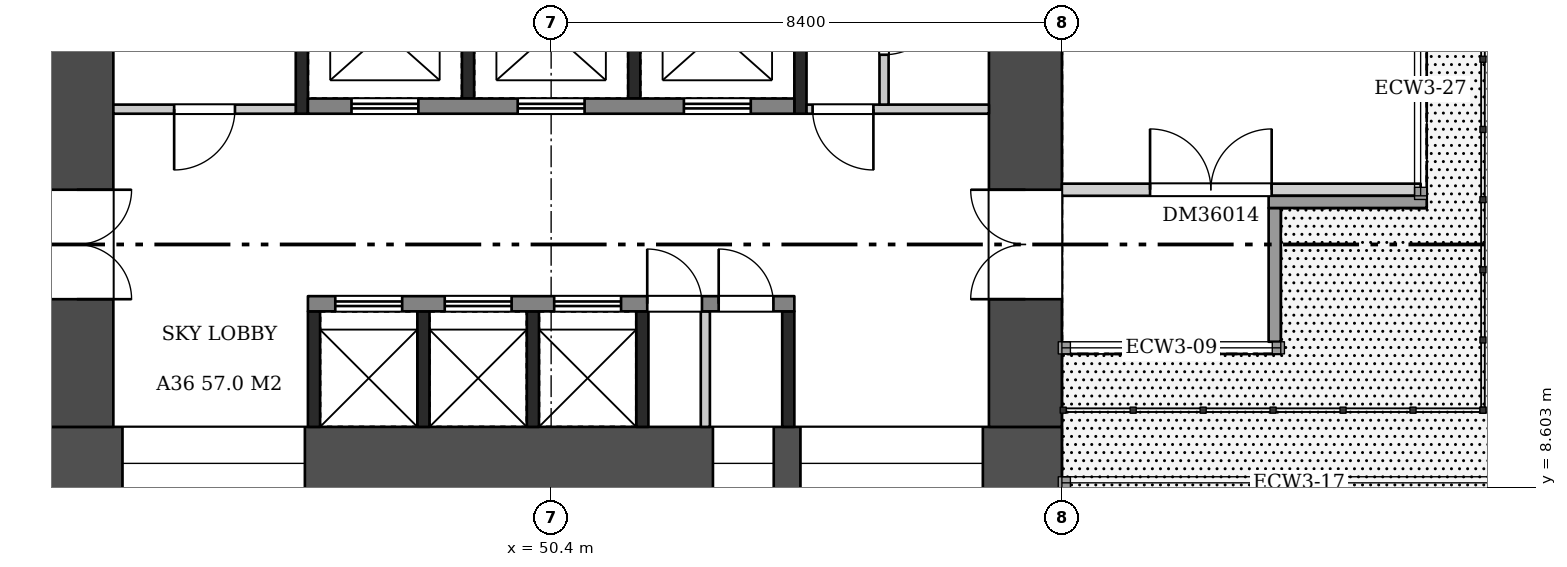
"""IFC4 building model, lengths in metres.
Left out: names, types, materials, properties, quantities, classifications, styles, units other than length and angle.
Written with IfcOpenShell. Run it as: python <this file> out.ifc"""

import sys

from ifc_helpers import new_model, si_unit, direction, frame, frame_2d, origin, place, context, subcontext, project, spatial, rectangle, extrude, element, fill, save


model = new_model("IFC4")
c1 = context("Model", 3, precision=1e-05, world=origin(), true_north=direction((0.0, 1.0)))
c2 = subcontext(c1, "Body", "Model", "MODEL_VIEW")
j1 = project(units=[si_unit("LENGTHUNIT", "METRE"), si_unit("PLANEANGLEUNIT", "RADIAN")], contexts=[c1])
p1 = place(None, origin())
s1 = spatial("IfcSite", under=j1, at=p1, CompositionType="ELEMENT")
p2 = place(p1, origin())
s2 = spatial("IfcBuilding", under=s1, at=p2, CompositionType="ELEMENT")
p3 = place(p2, frame((0.0, 0.0, 140.7)))
s3 = spatial("IfcBuildingStorey", under=s2, at=p3, CompositionType="ELEMENT", Elevation=140.7)
p4 = place(p3, frame((42.0, 9.0, 0.0), z_axis=(0.0, 0.0, 1.0), x_axis=(1.0, 0.0, 0.0)))
e1 = element("IfcWall", 1, at=p4, inside=s3, PredefinedType="SHEAR", context=c2, shape_type="SweptSolid", body=[
    extrude(rectangle(XDim=16.8, YDim=1.2, at=frame_2d((8.4, 0.0))), origin(), (0.0, 0.0, 1.0), 6.72),
])
p5 = place(p4, frame((1.35, 0.0, 0.6)))
e2 = element("IfcOpeningElement", 2, at=p5, cuts=e1, PredefinedType="OPENING", context=c2, shape_type="SweptSolid", body=[
    extrude(rectangle(XDim=3.0, YDim=2.1, at=frame_2d((1.5, 1.05))), frame((0.0, 0.61, 0.0), z_axis=(0.0, -1.0, 0.0), x_axis=(1.0, 0.0, 0.0)), (0.0, 0.0, 1.0), 1.22),
])
p6 = place(p4, frame((11.061, 0.0, 1.6)))
e3 = element("IfcOpeningElement", 3, at=p6, cuts=e1, PredefinedType="OPENING", context=c2, shape_type="SweptSolid", body=[
    extrude(rectangle(XDim=1.0, YDim=1.2, at=frame_2d((0.5, 0.6))), frame((0.0, 0.61, 0.0), z_axis=(0.0, -1.0, 0.0), x_axis=(1.0, 0.0, 0.0)), (0.0, 0.0, 1.0), 1.22),
])
p7 = place(p4, frame((12.5, 0.0, 0.6)))
e4 = element("IfcOpeningElement", 4, at=p7, cuts=e1, PredefinedType="OPENING", context=c2, shape_type="SweptSolid", body=[
    extrude(rectangle(XDim=3.0, YDim=2.1, at=frame_2d((1.5, 1.05))), frame((0.0, 0.61, 0.0), z_axis=(0.0, -1.0, 0.0), x_axis=(1.0, 0.0, 0.0)), (0.0, 0.0, 1.0), 1.22),
])
p8 = place(p3, frame((42.6, 9.6, 0.0), z_axis=(0.0, 0.0, 1.0), x_axis=(0.0, 1.0, 0.0)))
e5 = element("IfcWall", 5, at=p8, inside=s3, PredefinedType="SHEAR", context=c2, shape_type="SweptSolid", body=[
    extrude(rectangle(XDim=14.4, YDim=1.2, at=frame_2d((7.2, 0.0))), origin(), (0.0, 0.0, 1.0), 6.72),
])
p9 = place(p8, frame((2.1, 0.0, 0.0)))
e6 = element("IfcOpeningElement", 6, at=p9, cuts=e5, PredefinedType="OPENING", context=c2, shape_type="SweptSolid", body=[
    extrude(rectangle(XDim=1.8, YDim=2.1, at=frame_2d((0.9, 1.05))), frame((0.0, 0.61, 0.0), z_axis=(0.0, -1.0, 0.0), x_axis=(1.0, 0.0, 0.0)), (0.0, 0.0, 1.0), 1.22),
])
p10 = place(p3, frame((58.2, 9.6, 0.0), z_axis=(0.0, 0.0, 1.0), x_axis=(0.0, 1.0, 0.0)))
e7 = element("IfcWall", 7, at=p10, inside=s3, PredefinedType="SHEAR", context=c2, shape_type="SweptSolid", body=[
    extrude(rectangle(XDim=14.4, YDim=1.2, at=frame_2d((7.2, 0.0))), origin(), (0.0, 0.0, 1.0), 6.72),
])
p11 = place(p10, frame((2.1, 0.0, 0.0)))
e8 = element("IfcOpeningElement", 8, at=p11, cuts=e7, PredefinedType="OPENING", context=c2, shape_type="SweptSolid", body=[
    extrude(rectangle(XDim=1.8, YDim=2.1, at=frame_2d((0.9, 1.05))), frame((0.0, 0.61, 0.0), z_axis=(0.0, -1.0, 0.0), x_axis=(1.0, 0.0, 0.0)), (0.0, 0.0, 1.0), 1.22),
])
for number, where, z_axis, x_axis in (
    (9, (46.5, 9.6, 0.0), (0.0, 0.0, 1.0), (0.0, 1.0, 0.0)),
    (10, (48.3, 9.6, 0.0), (0.0, 0.0, 1.0), (0.0, 1.0, 0.0)),
    (11, (50.1, 9.6, 0.0), (0.0, 0.0, 1.0), (0.0, 1.0, 0.0)),
    (12, (51.9, 9.6, 0.0), (0.0, 0.0, 1.0), (0.0, 1.0, 0.0)),
    (13, (54.3, 9.6, 0.0), (0.0, 0.0, 1.0), (0.0, 1.0, 0.0)),
):
    element("IfcWall", number, at=place(p3, frame(where, z_axis=z_axis, x_axis=x_axis)), inside=s3, PredefinedType="SHEAR", context=c2, shape_type="SweptSolid", body=[
        extrude(rectangle(XDim=1.9, YDim=0.2, at=frame_2d((0.95, 0.0))), origin(), (0.0, 0.0, 1.0), 6.72),
    ])
p12 = place(p3, frame((52.936, 9.6, 0.0), z_axis=(0.0, 0.0, 1.0), x_axis=(0.0, 1.0, 0.0)))
e14 = element("IfcWall", 14, at=p12, inside=s3, PredefinedType="PARTITIONING", context=c2, shape_type="SweptSolid", body=[
    extrude(rectangle(XDim=1.9, YDim=0.15, at=frame_2d((0.95, 0.0))), origin(), (0.0, 0.0, 1.0), 6.72),
])
p13 = place(p3, frame((46.4, 11.625, 0.0), z_axis=(0.0, 0.0, 1.0), x_axis=(1.0, 0.0, 0.0)))
e15 = element("IfcWall", 15, at=p13, inside=s3, PredefinedType="SHEAR", context=c2, shape_type="SweptSolid", body=[
    extrude(rectangle(XDim=8.0, YDim=0.25, at=frame_2d((4.0, 0.0))), origin(), (0.0, 0.0, 1.0), 6.72),
])
p14 = place(p13, frame((0.45, 0.0, 0.0)))
e16 = element("IfcOpeningElement", 16, at=p14, cuts=e15, PredefinedType="OPENING", context=c2, shape_type="SweptSolid", body=[
    extrude(rectangle(XDim=1.1, YDim=2.1, at=frame_2d((0.55, 1.05))), frame((0.0, 0.135, 0.0), z_axis=(0.0, -1.0, 0.0), x_axis=(1.0, 0.0, 0.0)), (0.0, 0.0, 1.0), 0.27),
])
p15 = place(p13, frame((2.25, 0.0, 0.0)))
e17 = element("IfcOpeningElement", 17, at=p15, cuts=e15, PredefinedType="OPENING", context=c2, shape_type="SweptSolid", body=[
    extrude(rectangle(XDim=1.1, YDim=2.1, at=frame_2d((0.55, 1.05))), frame((0.0, 0.135, 0.0), z_axis=(0.0, -1.0, 0.0), x_axis=(1.0, 0.0, 0.0)), (0.0, 0.0, 1.0), 0.27),
])
p16 = place(p13, frame((4.05, 0.0, 0.0)))
e18 = element("IfcOpeningElement", 18, at=p16, cuts=e15, PredefinedType="OPENING", context=c2, shape_type="SweptSolid", body=[
    extrude(rectangle(XDim=1.1, YDim=2.1, at=frame_2d((0.55, 1.05))), frame((0.0, 0.135, 0.0), z_axis=(0.0, -1.0, 0.0), x_axis=(1.0, 0.0, 0.0)), (0.0, 0.0, 1.0), 0.27),
])
p17 = place(p13, frame((5.581, 0.0, 0.0)))
e19 = element("IfcOpeningElement", 19, at=p17, cuts=e15, PredefinedType="OPENING", context=c2, shape_type="SweptSolid", body=[
    extrude(rectangle(XDim=0.9, YDim=2.1, at=frame_2d((0.45, 1.05))), frame((0.0, 0.135, 0.0), z_axis=(0.0, -1.0, 0.0), x_axis=(1.0, 0.0, 0.0)), (0.0, 0.0, 1.0), 0.27),
])
p18 = place(p13, frame((6.756, 0.0, 0.0)))
e20 = element("IfcOpeningElement", 20, at=p18, cuts=e15, PredefinedType="OPENING", context=c2, shape_type="SweptSolid", body=[
    extrude(rectangle(XDim=0.9, YDim=2.1, at=frame_2d((0.45, 1.05))), frame((0.0, 0.135, 0.0), z_axis=(0.0, -1.0, 0.0), x_axis=(1.0, 0.0, 0.0)), (0.0, 0.0, 1.0), 0.27),
])
for number, where, z_axis, x_axis in (
    (21, (49.033, 15.0, 0.0), (0.0, 0.0, 1.0), (0.0, 1.0, 0.0)),
    (22, (51.767, 15.0, 0.0), (0.0, 0.0, 1.0), (0.0, 1.0, 0.0)),
):
    element("IfcWall", number, at=place(p3, frame(where, z_axis=z_axis, x_axis=x_axis)), inside=s3, PredefinedType="SHEAR", context=c2, shape_type="SweptSolid", body=[
        extrude(rectangle(XDim=1.9, YDim=0.2, at=frame_2d((0.95, 0.0))), origin(), (0.0, 0.0, 1.0), 6.72),
    ])
p19 = place(p3, frame((46.4, 14.875, 0.0), z_axis=(0.0, 0.0, 1.0), x_axis=(1.0, 0.0, 0.0)))
e23 = element("IfcWall", 23, at=p19, inside=s3, PredefinedType="SHEAR", context=c2, shape_type="SweptSolid", body=[
    extrude(rectangle(XDim=8.0, YDim=0.25, at=frame_2d((4.0, 0.0))), origin(), (0.0, 0.0, 1.0), 6.72),
])
p20 = place(p19, frame((0.717, 0.0, 0.0)))
e24 = element("IfcOpeningElement", 24, at=p20, cuts=e23, PredefinedType="OPENING", context=c2, shape_type="SweptSolid", body=[
    extrude(rectangle(XDim=1.1, YDim=2.1, at=frame_2d((0.55, 1.05))), frame((0.0, 0.135, 0.0), z_axis=(0.0, -1.0, 0.0), x_axis=(1.0, 0.0, 0.0)), (0.0, 0.0, 1.0), 0.27),
])
p21 = place(p19, frame((3.45, 0.0, 0.0)))
e25 = element("IfcOpeningElement", 25, at=p21, cuts=e23, PredefinedType="OPENING", context=c2, shape_type="SweptSolid", body=[
    extrude(rectangle(XDim=1.1, YDim=2.1, at=frame_2d((0.55, 1.05))), frame((0.0, 0.135, 0.0), z_axis=(0.0, -1.0, 0.0), x_axis=(1.0, 0.0, 0.0)), (0.0, 0.0, 1.0), 0.27),
])
p22 = place(p19, frame((6.183, 0.0, 0.0)))
e26 = element("IfcOpeningElement", 26, at=p22, cuts=e23, PredefinedType="OPENING", context=c2, shape_type="SweptSolid", body=[
    extrude(rectangle(XDim=1.1, YDim=2.1, at=frame_2d((0.55, 1.05))), frame((0.0, 0.135, 0.0), z_axis=(0.0, -1.0, 0.0), x_axis=(1.0, 0.0, 0.0)), (0.0, 0.0, 1.0), 0.27),
])
p23 = place(p3, frame((46.3, 14.75, 0.0), z_axis=(0.0, 0.0, 1.0), x_axis=(0.0, 1.0, 0.0)))
e27 = element("IfcWall", 27, at=p23, inside=s3, PredefinedType="SHEAR", context=c2, shape_type="SweptSolid", body=[
    extrude(rectangle(XDim=2.4, YDim=0.2, at=frame_2d((1.2, 0.0))), origin(), (0.0, 0.0, 1.0), 6.72),
])
p24 = place(p3, frame((43.2, 14.825, 0.0), z_axis=(0.0, 0.0, 1.0), x_axis=(1.0, 0.0, 0.0)))
e28 = element("IfcWall", 28, at=p24, inside=s3, PredefinedType="PARTITIONING", context=c2, shape_type="SweptSolid", body=[
    extrude(rectangle(XDim=3.0, YDim=0.15, at=frame_2d((1.5, 0.0))), origin(), (0.0, 0.0, 1.0), 6.72),
])
p25 = place(p24, frame((1.0, 0.0, 0.0)))
e29 = element("IfcOpeningElement", 29, at=p25, cuts=e28, PredefinedType="OPENING", context=c2, shape_type="SweptSolid", body=[
    extrude(rectangle(XDim=1.0, YDim=2.1, at=frame_2d((0.5, 1.05))), frame((0.0, 0.085, 0.0), z_axis=(0.0, -1.0, 0.0), x_axis=(1.0, 0.0, 0.0)), (0.0, 0.0, 1.0), 0.17),
])
p26 = place(p3, frame((54.5, 14.75, 0.0), z_axis=(0.0, 0.0, 1.0), x_axis=(0.0, 1.0, 0.0)))
e30 = element("IfcWall", 30, at=p26, inside=s3, PredefinedType="SHEAR", context=c2, shape_type="SweptSolid", body=[
    extrude(rectangle(XDim=9.25, YDim=0.2, at=frame_2d((4.625, 0.0))), origin(), (0.0, 0.0, 1.0), 6.72),
])
p27 = place(p3, frame((54.6, 14.825, 0.0), z_axis=(0.0, 0.0, 1.0), x_axis=(1.0, 0.0, 0.0)))
e31 = element("IfcWall", 31, at=p27, inside=s3, PredefinedType="PARTITIONING", context=c2, shape_type="SweptSolid", body=[
    extrude(rectangle(XDim=3.0, YDim=0.15, at=frame_2d((1.5, 0.0))), origin(), (0.0, 0.0, 1.0), 6.72),
])
p28 = place(p27, frame((0.1, 0.0, 0.0)))
e32 = element("IfcOpeningElement", 32, at=p28, cuts=e31, PredefinedType="OPENING", context=c2, shape_type="SweptSolid", body=[
    extrude(rectangle(XDim=1.0, YDim=2.1, at=frame_2d((0.5, 1.05))), frame((0.0, 0.085, 0.0), z_axis=(0.0, -1.0, 0.0), x_axis=(1.0, 0.0, 0.0)), (0.0, 0.0, 1.0), 0.17),
])
p29 = place(p3, frame((55.875, 14.9, 0.0), z_axis=(0.0, 0.0, 1.0), x_axis=(0.0, 1.0, 0.0)))
e33 = element("IfcWall", 33, at=p29, inside=s3, PredefinedType="PARTITIONING", context=c2, shape_type="SweptSolid", body=[
    extrude(rectangle(XDim=9.1, YDim=0.15, at=frame_2d((4.55, 0.0))), origin(), (0.0, 0.0, 1.0), 6.72),
])
p30 = place(p29, frame((0.82, 0.0, 0.0)))
e34 = element("IfcOpeningElement", 34, at=p30, cuts=e33, PredefinedType="OPENING", context=c2, shape_type="SweptSolid", body=[
    extrude(rectangle(XDim=1.0, YDim=2.1, at=frame_2d((0.5, 1.05))), frame((0.0, 0.085, 0.0), z_axis=(0.0, -1.0, 0.0), x_axis=(1.0, 0.0, 0.0)), (0.0, 0.0, 1.0), 0.17),
])
p31 = place(p29, frame((3.748, 0.0, 0.0)))
e35 = element("IfcOpeningElement", 35, at=p31, cuts=e33, PredefinedType="OPENING", context=c2, shape_type="SweptSolid", body=[
    extrude(rectangle(XDim=0.9, YDim=2.1, at=frame_2d((0.45, 1.05))), frame((0.0, 0.085, 0.0), z_axis=(0.0, -1.0, 0.0), x_axis=(1.0, 0.0, 0.0)), (0.0, 0.0, 1.0), 0.17),
])
p32 = place(p29, frame((6.978, 0.0, 0.0)))
e36 = element("IfcOpeningElement", 36, at=p32, cuts=e33, PredefinedType="OPENING", context=c2, shape_type="SweptSolid", body=[
    extrude(rectangle(XDim=0.9, YDim=2.1, at=frame_2d((0.45, 1.05))), frame((0.0, 0.085, 0.0), z_axis=(0.0, -1.0, 0.0), x_axis=(1.0, 0.0, 0.0)), (0.0, 0.0, 1.0), 0.17),
])
p33 = place(p3, frame((58.8, 13.5, 0.0), z_axis=(0.0, 0.0, 1.0), x_axis=(1.0, 0.0, 0.0)))
e37 = element("IfcWall", 37, at=p33, inside=s3, PredefinedType="PARTITIONING", context=c2, shape_type="SweptSolid", body=[
    extrude(rectangle(XDim=5.9, YDim=0.2, at=frame_2d((2.95, 0.0))), origin(), (0.0, 0.0, 1.0), 6.72),
])
p34 = place(p33, frame((1.45, 0.0, 0.0)))
e38 = element("IfcOpeningElement", 38, at=p34, cuts=e37, PredefinedType="OPENING", context=c2, shape_type="SweptSolid", body=[
    extrude(rectangle(XDim=2.0, YDim=2.1, at=frame_2d((1.0, 1.05))), frame((0.0, 0.11, 0.0), z_axis=(0.0, -1.0, 0.0), x_axis=(1.0, 0.0, 0.0)), (0.0, 0.0, 1.0), 0.22),
])
p35 = place(p3, frame((62.3, 11.0, 0.0), z_axis=(0.0, 0.0, 1.0), x_axis=(0.0, 1.0, 0.0)))
e39 = element("IfcWall", 39, at=p35, inside=s3, PredefinedType="SOLIDWALL", context=c2, shape_type="SweptSolid", body=[
    extrude(rectangle(XDim=2.2, YDim=0.2, at=frame_2d((1.1, 0.0))), origin(), (0.0, 0.0, 1.0), 6.72),
])
p36 = place(p3, frame((62.2, 13.3, 0.0), z_axis=(0.0, 0.0, 1.0), x_axis=(1.0, 0.0, 0.0)))
e40 = element("IfcWall", 40, at=p36, inside=s3, PredefinedType="SOLIDWALL", context=c2, shape_type="SweptSolid", body=[
    extrude(rectangle(XDim=2.6, YDim=0.2, at=frame_2d((1.3, 0.0))), origin(), (0.0, 0.0, 1.0), 6.72),
])
p37 = place(p9, frame((1.8, 0.0, 0.0), z_axis=(0.0, 0.0, 1.0), x_axis=(-1.0, 0.0, 0.0)))
e41 = element("IfcDoor", 41, at=p37, inside=s3, OperationType="DOUBLE_DOOR_SINGLE_SWING", PredefinedType="DOOR", context=c2, shape_type="SweptSolid", body=[
    extrude(rectangle(XDim=1.8, YDim=2.1, at=frame_2d((0.9, 1.05))), frame((0.0, 0.025, 0.0), z_axis=(0.0, -1.0, 0.0), x_axis=(1.0, 0.0, 0.0)), (0.0, 0.0, 1.0), 0.05),
])
fill(e6, e41)
p38 = place(p11, origin())
e42 = element("IfcDoor", 42, at=p38, inside=s3, OperationType="DOUBLE_DOOR_SINGLE_SWING", PredefinedType="DOOR", context=c2, shape_type="SweptSolid", body=[
    extrude(rectangle(XDim=1.8, YDim=2.1, at=frame_2d((0.9, 1.05))), frame((0.0, 0.025, 0.0), z_axis=(0.0, -1.0, 0.0), x_axis=(1.0, 0.0, 0.0)), (0.0, 0.0, 1.0), 0.05),
])
fill(e8, e42)
p39 = place(p14, origin())
e43 = element("IfcDoor", 43, at=p39, inside=s3, OperationType="DOUBLE_DOOR_SLIDING", PredefinedType="DOOR", context=c2, shape_type="SweptSolid", body=[
    extrude(rectangle(XDim=1.1, YDim=2.1, at=frame_2d((0.55, 1.05))), frame((0.0, 0.025, 0.0), z_axis=(0.0, -1.0, 0.0), x_axis=(1.0, 0.0, 0.0)), (0.0, 0.0, 1.0), 0.05),
])
fill(e16, e43)
p40 = place(p15, origin())
e44 = element("IfcDoor", 44, at=p40, inside=s3, OperationType="DOUBLE_DOOR_SLIDING", PredefinedType="DOOR", context=c2, shape_type="SweptSolid", body=[
    extrude(rectangle(XDim=1.1, YDim=2.1, at=frame_2d((0.55, 1.05))), frame((0.0, 0.025, 0.0), z_axis=(0.0, -1.0, 0.0), x_axis=(1.0, 0.0, 0.0)), (0.0, 0.0, 1.0), 0.05),
])
fill(e17, e44)
p41 = place(p16, origin())
e45 = element("IfcDoor", 45, at=p41, inside=s3, OperationType="DOUBLE_DOOR_SLIDING", PredefinedType="DOOR", context=c2, shape_type="SweptSolid", body=[
    extrude(rectangle(XDim=1.1, YDim=2.1, at=frame_2d((0.55, 1.05))), frame((0.0, 0.025, 0.0), z_axis=(0.0, -1.0, 0.0), x_axis=(1.0, 0.0, 0.0)), (0.0, 0.0, 1.0), 0.05),
])
fill(e18, e45)
p42 = place(p17, origin())
e46 = element("IfcDoor", 46, at=p42, inside=s3, OperationType="SINGLE_SWING_LEFT", PredefinedType="DOOR", context=c2, shape_type="SweptSolid", body=[
    extrude(rectangle(XDim=0.9, YDim=2.1, at=frame_2d((0.45, 1.05))), frame((0.0, 0.025, 0.0), z_axis=(0.0, -1.0, 0.0), x_axis=(1.0, 0.0, 0.0)), (0.0, 0.0, 1.0), 0.05),
])
fill(e19, e46)
p43 = place(p18, origin())
e47 = element("IfcDoor", 47, at=p43, inside=s3, OperationType="SINGLE_SWING_LEFT", PredefinedType="DOOR", context=c2, shape_type="SweptSolid", body=[
    extrude(rectangle(XDim=0.9, YDim=2.1, at=frame_2d((0.45, 1.05))), frame((0.0, 0.025, 0.0), z_axis=(0.0, -1.0, 0.0), x_axis=(1.0, 0.0, 0.0)), (0.0, 0.0, 1.0), 0.05),
])
fill(e20, e47)
p44 = place(p20, origin())
e48 = element("IfcDoor", 48, at=p44, inside=s3, OperationType="DOUBLE_DOOR_SLIDING", PredefinedType="DOOR", context=c2, shape_type="SweptSolid", body=[
    extrude(rectangle(XDim=1.1, YDim=2.1, at=frame_2d((0.55, 1.05))), frame((0.0, 0.025, 0.0), z_axis=(0.0, -1.0, 0.0), x_axis=(1.0, 0.0, 0.0)), (0.0, 0.0, 1.0), 0.05),
])
fill(e24, e48)
p45 = place(p21, origin())
e49 = element("IfcDoor", 49, at=p45, inside=s3, OperationType="DOUBLE_DOOR_SLIDING", PredefinedType="DOOR", context=c2, shape_type="SweptSolid", body=[
    extrude(rectangle(XDim=1.1, YDim=2.1, at=frame_2d((0.55, 1.05))), frame((0.0, 0.025, 0.0), z_axis=(0.0, -1.0, 0.0), x_axis=(1.0, 0.0, 0.0)), (0.0, 0.0, 1.0), 0.05),
])
fill(e25, e49)
p46 = place(p22, origin())
e50 = element("IfcDoor", 50, at=p46, inside=s3, OperationType="DOUBLE_DOOR_SLIDING", PredefinedType="DOOR", context=c2, shape_type="SweptSolid", body=[
    extrude(rectangle(XDim=1.1, YDim=2.1, at=frame_2d((0.55, 1.05))), frame((0.0, 0.025, 0.0), z_axis=(0.0, -1.0, 0.0), x_axis=(1.0, 0.0, 0.0)), (0.0, 0.0, 1.0), 0.05),
])
fill(e26, e50)
p47 = place(p25, frame((1.0, 0.0, 0.0), z_axis=(0.0, 0.0, 1.0), x_axis=(-1.0, 0.0, 0.0)))
e51 = element("IfcDoor", 51, at=p47, inside=s3, OperationType="SINGLE_SWING_RIGHT", PredefinedType="DOOR", context=c2, shape_type="SweptSolid", body=[
    extrude(rectangle(XDim=1.0, YDim=2.1, at=frame_2d((0.5, 1.05))), frame((0.0, 0.025, 0.0), z_axis=(0.0, -1.0, 0.0), x_axis=(1.0, 0.0, 0.0)), (0.0, 0.0, 1.0), 0.05),
])
fill(e29, e51)
p48 = place(p28, frame((1.0, 0.0, 0.0), z_axis=(0.0, 0.0, 1.0), x_axis=(-1.0, 0.0, 0.0)))
e52 = element("IfcDoor", 52, at=p48, inside=s3, OperationType="SINGLE_SWING_LEFT", PredefinedType="DOOR", context=c2, shape_type="SweptSolid", body=[
    extrude(rectangle(XDim=1.0, YDim=2.1, at=frame_2d((0.5, 1.05))), frame((0.0, 0.025, 0.0), z_axis=(0.0, -1.0, 0.0), x_axis=(1.0, 0.0, 0.0)), (0.0, 0.0, 1.0), 0.05),
])
fill(e32, e52)
p49 = place(p30, frame((1.0, 0.0, 0.0), z_axis=(0.0, 0.0, 1.0), x_axis=(-1.0, 0.0, 0.0)))
e53 = element("IfcDoor", 53, at=p49, inside=s3, OperationType="SINGLE_SWING_LEFT", PredefinedType="DOOR", context=c2, shape_type="SweptSolid", body=[
    extrude(rectangle(XDim=1.0, YDim=2.1, at=frame_2d((0.5, 1.05))), frame((0.0, 0.025, 0.0), z_axis=(0.0, -1.0, 0.0), x_axis=(1.0, 0.0, 0.0)), (0.0, 0.0, 1.0), 0.05),
])
fill(e34, e53)
p50 = place(p5, origin())
e54 = element("IfcWindow", 54, at=p50, inside=s3, PartitioningType="SINGLE_PANEL", PredefinedType="WINDOW", context=c2, shape_type="SweptSolid", body=[
    extrude(rectangle(XDim=3.0, YDim=2.1, at=frame_2d((1.5, 1.05))), frame((0.0, 0.03, 0.0), z_axis=(0.0, -1.0, 0.0), x_axis=(1.0, 0.0, 0.0)), (0.0, 0.0, 1.0), 0.06),
])
fill(e2, e54)
p51 = place(p6, origin())
e55 = element("IfcWindow", 55, at=p51, inside=s3, PartitioningType="SINGLE_PANEL", PredefinedType="WINDOW", context=c2, shape_type="SweptSolid", body=[
    extrude(rectangle(XDim=1.0, YDim=1.2, at=frame_2d((0.5, 0.6))), frame((0.0, 0.03, 0.0), z_axis=(0.0, -1.0, 0.0), x_axis=(1.0, 0.0, 0.0)), (0.0, 0.0, 1.0), 0.06),
])
fill(e3, e55)
p52 = place(p7, origin())
e56 = element("IfcWindow", 56, at=p52, inside=s3, PartitioningType="SINGLE_PANEL", PredefinedType="WINDOW", context=c2, shape_type="SweptSolid", body=[
    extrude(rectangle(XDim=3.0, YDim=2.1, at=frame_2d((1.5, 1.05))), frame((0.0, 0.03, 0.0), z_axis=(0.0, -1.0, 0.0), x_axis=(1.0, 0.0, 0.0)), (0.0, 0.0, 1.0), 0.06),
])
fill(e4, e56)
p53 = place(p34, origin())
e57 = element("IfcDoor", 57, at=p53, inside=s3, OperationType="DOUBLE_DOOR_SINGLE_SWING", PredefinedType="DOOR", context=c2, shape_type="SweptSolid", body=[
    extrude(rectangle(XDim=2.0, YDim=2.1, at=frame_2d((1.0, 1.05))), frame((0.0, 0.025, 0.0), z_axis=(0.0, -1.0, 0.0), x_axis=(1.0, 0.0, 0.0)), (0.0, 0.0, 1.0), 0.05),
])
fill(e38, e57)
save(model, sys.argv[1])
